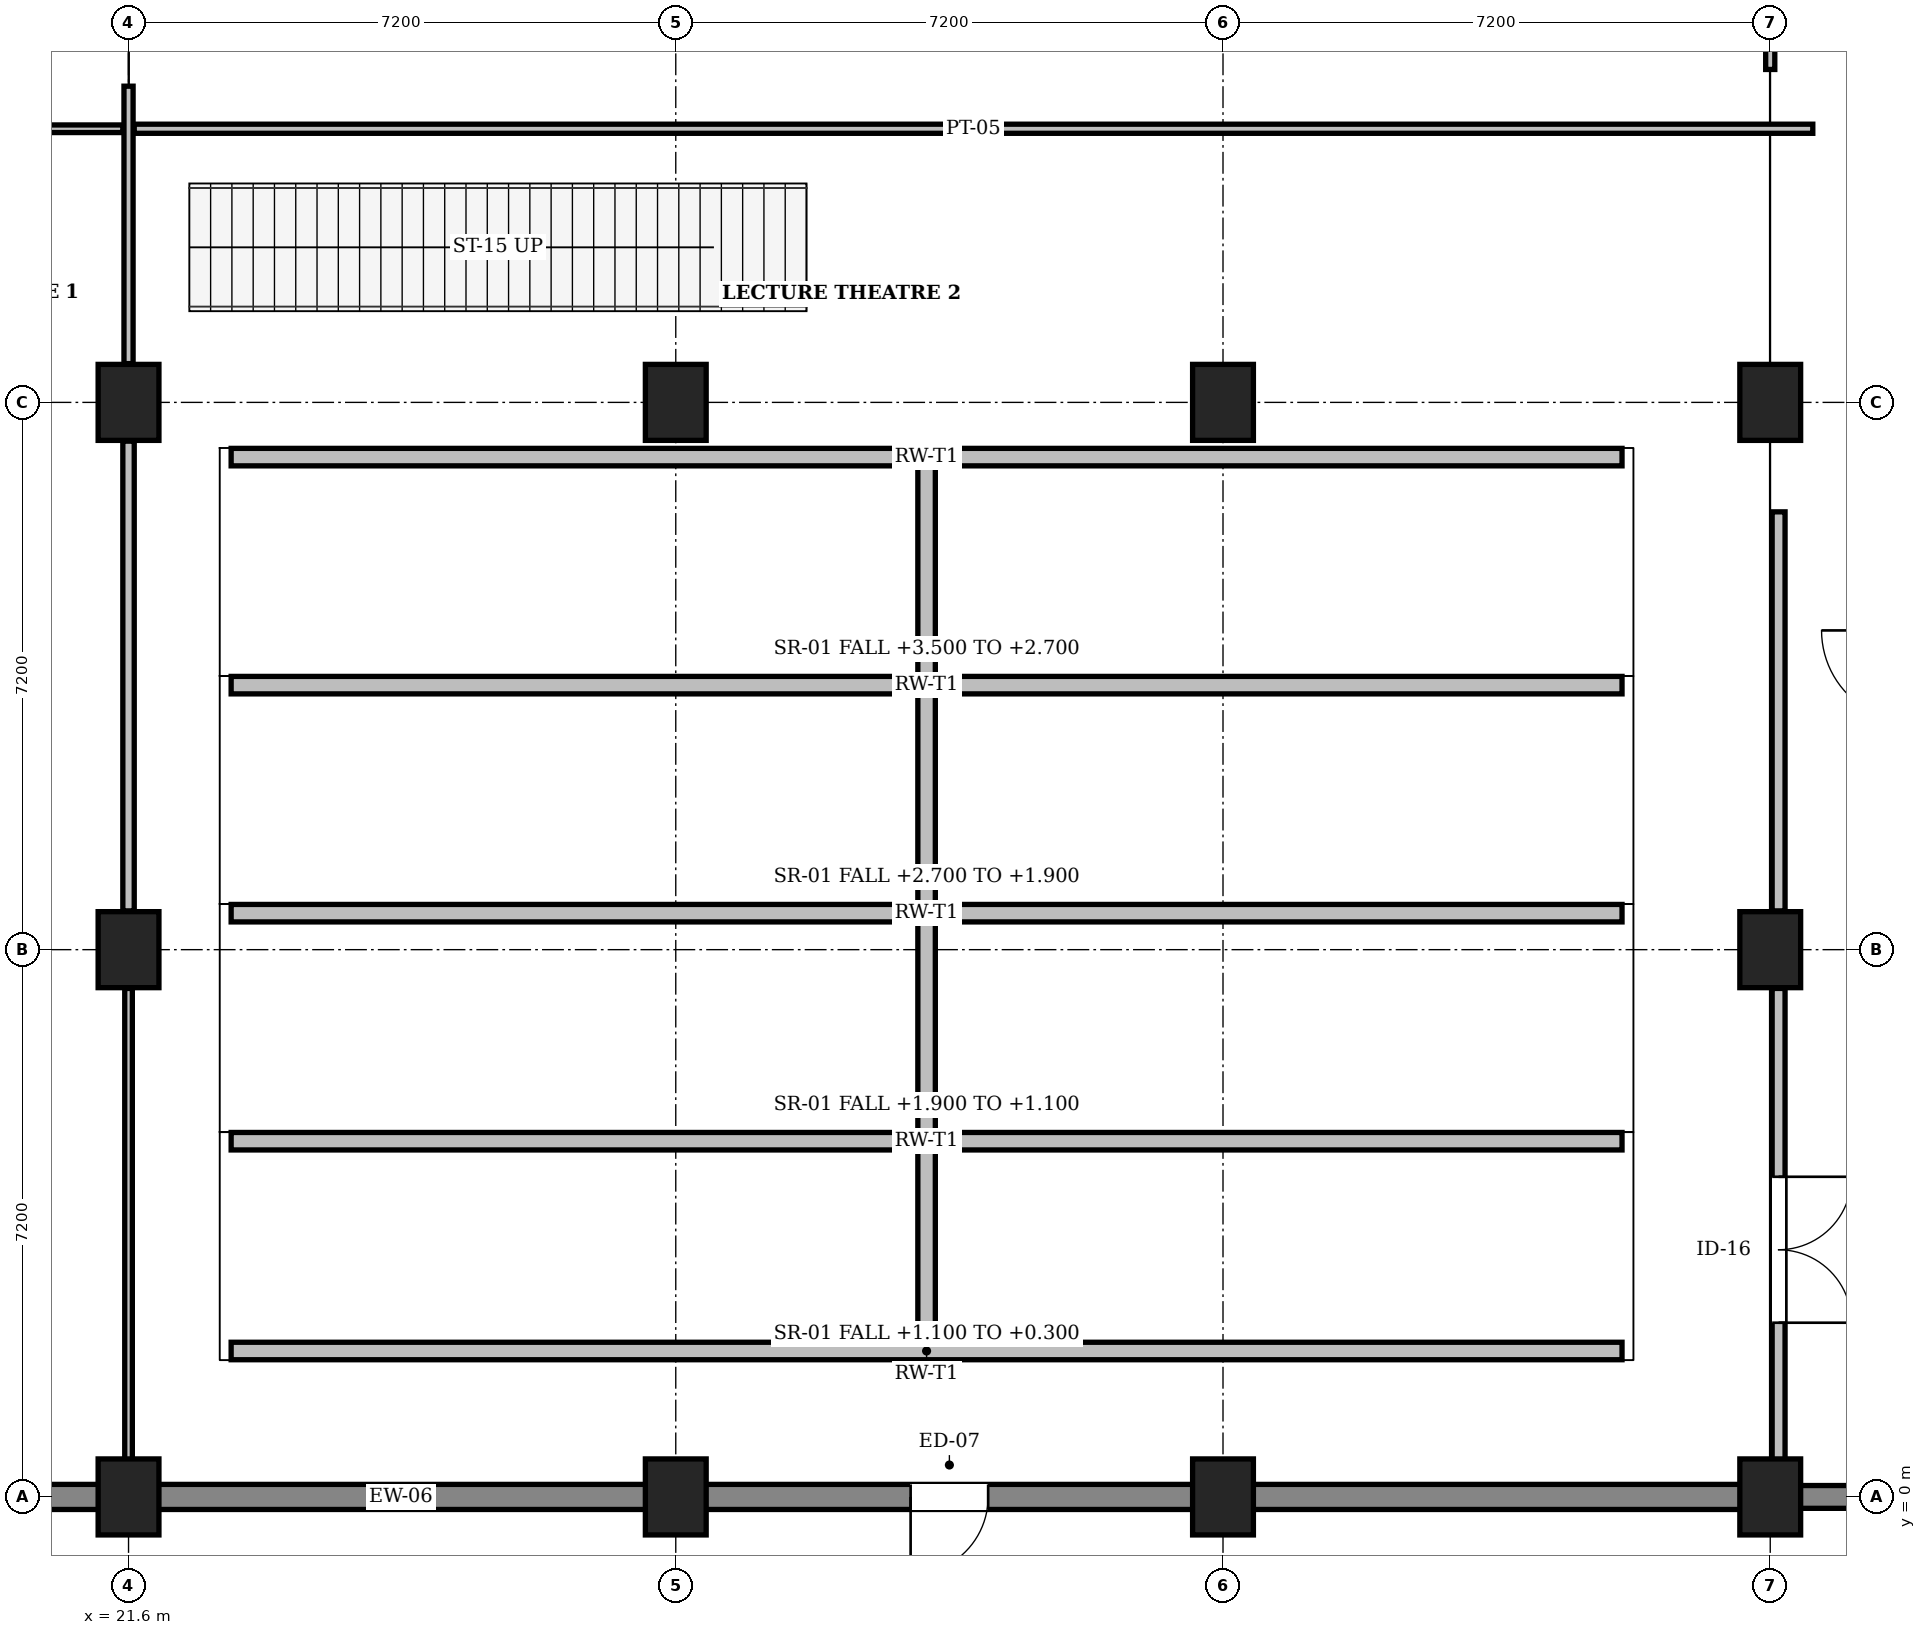
"""IFC4 building model, lengths in metres.
Left out: names, types, materials, properties, quantities, classifications, styles, units other than length and angle.
Written with IfcOpenShell. Run it as: python <this file> out.ifc"""

import sys

from ifc_helpers import new_model, si_unit, direction, frame, frame_2d, origin, origin_2d, place, context, subcontext, project, spatial, rectangle, extrude, element, fill, save


model = new_model("IFC4")
c1 = context("Model", 3, precision=1e-05, world=origin(), true_north=direction((0.0, 1.0)))
c2 = subcontext(c1, "Body", "Model", "MODEL_VIEW")
j1 = project(units=[si_unit("LENGTHUNIT", "METRE"), si_unit("PLANEANGLEUNIT", "RADIAN")], contexts=[c1])
p1 = place(None, origin())
s1 = spatial("IfcSite", under=j1, at=p1, CompositionType="ELEMENT")
p2 = place(p1, origin())
s2 = spatial("IfcBuilding", under=s1, at=p2, CompositionType="ELEMENT")
p3 = place(p2, origin())
s3 = spatial("IfcBuildingStorey", under=s2, at=p3, CompositionType="ELEMENT", Elevation=0.0)
for number, where, z_axis, x_axis in (
    (1, (21.6, 0.0, 0.0), (0.0, 0.0, 1.0), (1.0, 0.0, 0.0)),
    (2, (21.6, 7.2, 0.0), (0.0, 0.0, 1.0), (1.0, 0.0, 0.0)),
    (3, (21.6, 14.4, 0.0), (0.0, 0.0, 1.0), (1.0, 0.0, 0.0)),
    (4, (28.8, 0.0, 0.0), (0.0, 0.0, 1.0), (1.0, 0.0, 0.0)),
    (5, (28.8, 14.4, 0.0), (0.0, 0.0, 1.0), (1.0, 0.0, 0.0)),
    (6, (36.0, 0.0, 0.0), (0.0, 0.0, 1.0), (1.0, 0.0, 0.0)),
    (7, (36.0, 14.4, 0.0), (0.0, 0.0, 1.0), (1.0, 0.0, 0.0)),
    (8, (43.2, 0.0, 0.0), (0.0, 0.0, 1.0), (1.0, 0.0, 0.0)),
    (9, (43.2, 7.2, 0.0), (0.0, 0.0, 1.0), (1.0, 0.0, 0.0)),
    (10, (43.2, 14.4, 0.0), (0.0, 0.0, 1.0), (1.0, 0.0, 0.0)),
):
    element("IfcColumn", number, at=place(p3, frame(where, z_axis=z_axis, x_axis=x_axis)), inside=s3, PredefinedType="COLUMN", context=c2, shape_type="SweptSolid", body=[
        extrude(rectangle(XDim=0.8, YDim=1.0, at=origin_2d()), origin(), (0.0, 0.0, 1.0), 4.8),
    ])
p4 = place(p3, frame((22.95, 1.92, 0.0), z_axis=(0.0, 0.0, 1.0), x_axis=(1.0, 0.0, 0.0)))
e11 = element("IfcWall", 11, at=p4, inside=s3, PredefinedType="SOLIDWALL", context=c2, shape_type="SweptSolid", body=[
    extrude(rectangle(XDim=18.3, YDim=0.23, at=frame_2d((9.15, 0.0))), origin(), (0.0, 0.0, 1.0), 0.1),
])
p5 = place(p3, frame((22.95, 4.68, 0.0), z_axis=(0.0, 0.0, 1.0), x_axis=(1.0, 0.0, 0.0)))
e12 = element("IfcWall", 12, at=p5, inside=s3, PredefinedType="SOLIDWALL", context=c2, shape_type="SweptSolid", body=[
    extrude(rectangle(XDim=18.3, YDim=0.23, at=frame_2d((9.15, 0.0))), origin(), (0.0, 0.0, 1.0), 0.88),
])
p6 = place(p3, frame((32.1, 2.035, 0.0), z_axis=(0.0, 0.0, 1.0), x_axis=(0.0, 1.0, 0.0)))
e13 = element("IfcWall", 13, at=p6, inside=s3, PredefinedType="SOLIDWALL", context=c2, shape_type="SweptSolid", body=[
    extrude(rectangle(XDim=2.53, YDim=0.23, at=frame_2d((1.265, 0.0))), origin(), (0.0, 0.0, 1.0), 0.48),
])
p7 = place(p3, frame((22.95, 7.68, 0.0), z_axis=(0.0, 0.0, 1.0), x_axis=(1.0, 0.0, 0.0)))
e14 = element("IfcWall", 14, at=p7, inside=s3, PredefinedType="SOLIDWALL", context=c2, shape_type="SweptSolid", body=[
    extrude(rectangle(XDim=18.3, YDim=0.23, at=frame_2d((9.15, 0.0))), origin(), (0.0, 0.0, 1.0), 1.68),
])
p8 = place(p3, frame((32.1, 4.795, 0.0), z_axis=(0.0, 0.0, 1.0), x_axis=(0.0, 1.0, 0.0)))
e15 = element("IfcWall", 15, at=p8, inside=s3, PredefinedType="SOLIDWALL", context=c2, shape_type="SweptSolid", body=[
    extrude(rectangle(XDim=2.77, YDim=0.23, at=frame_2d((1.385, 0.0))), origin(), (0.0, 0.0, 1.0), 1.28),
])
p9 = place(p3, frame((22.95, 10.68, 0.0), z_axis=(0.0, 0.0, 1.0), x_axis=(1.0, 0.0, 0.0)))
e16 = element("IfcWall", 16, at=p9, inside=s3, PredefinedType="SOLIDWALL", context=c2, shape_type="SweptSolid", body=[
    extrude(rectangle(XDim=18.3, YDim=0.23, at=frame_2d((9.15, 0.0))), origin(), (0.0, 0.0, 1.0), 2.48),
])
p10 = place(p3, frame((32.1, 7.795, 0.0), z_axis=(0.0, 0.0, 1.0), x_axis=(0.0, 1.0, 0.0)))
e17 = element("IfcWall", 17, at=p10, inside=s3, PredefinedType="SOLIDWALL", context=c2, shape_type="SweptSolid", body=[
    extrude(rectangle(XDim=2.77, YDim=0.23, at=frame_2d((1.385, 0.0))), origin(), (0.0, 0.0, 1.0), 2.08),
])
p11 = place(p3, frame((22.95, 13.68, 0.0), z_axis=(0.0, 0.0, 1.0), x_axis=(1.0, 0.0, 0.0)))
e18 = element("IfcWall", 18, at=p11, inside=s3, PredefinedType="SOLIDWALL", context=c2, shape_type="SweptSolid", body=[
    extrude(rectangle(XDim=18.3, YDim=0.23, at=frame_2d((9.15, 0.0))), origin(), (0.0, 0.0, 1.0), 3.28),
])
p12 = place(p3, frame((32.1, 10.795, 0.0), z_axis=(0.0, 0.0, 1.0), x_axis=(0.0, 1.0, 0.0)))
e19 = element("IfcWall", 19, at=p12, inside=s3, PredefinedType="SOLIDWALL", context=c2, shape_type="SweptSolid", body=[
    extrude(rectangle(XDim=2.77, YDim=0.23, at=frame_2d((1.385, 0.0))), origin(), (0.0, 0.0, 1.0), 2.88),
])
p13 = place(p3, frame((50.4, 0.0, 0.0), z_axis=(0.0, 0.0, 1.0), x_axis=(-1.0, 0.0, 0.0)))
e20 = element("IfcWall", 20, at=p13, inside=s3, PredefinedType="SOLIDWALL", context=c2, shape_type="SweptSolid", body=[
    extrude(rectangle(XDim=7.2, YDim=0.3, at=frame_2d((3.6, 0.0))), origin(), (0.0, 0.0, 1.0), 4.52),
])
p14 = place(p13, frame((2.8, 0.0, 0.0)))
e21 = element("IfcOpeningElement", 21, at=p14, cuts=e20, PredefinedType="OPENING", context=c2, shape_type="SweptSolid", body=[
    extrude(rectangle(XDim=1.6, YDim=2.2, at=frame_2d((0.8, 1.1))), frame((0.0, 0.162, 0.0), z_axis=(0.0, -1.0, 0.0), x_axis=(1.0, 0.0, 0.0)), (0.0, 0.0, 1.0), 0.324),
])
p15 = place(p3, frame((43.2, 0.0, 0.0), z_axis=(0.0, 0.0, 1.0), x_axis=(-1.0, 0.0, 0.0)))
e22 = element("IfcWall", 22, at=p15, inside=s3, PredefinedType="SOLIDWALL", context=c2, shape_type="SweptSolid", body=[
    extrude(rectangle(XDim=7.2, YDim=0.33, at=frame_2d((3.6, 0.0))), origin(), (0.0, 0.0, 1.0), 4.52),
])
p16 = place(p3, frame((36.0, 0.0, 0.0), z_axis=(0.0, 0.0, 1.0), x_axis=(-1.0, 0.0, 0.0)))
e23 = element("IfcWall", 23, at=p16, inside=s3, PredefinedType="SOLIDWALL", context=c2, shape_type="SweptSolid", body=[
    extrude(rectangle(XDim=7.2, YDim=0.33, at=frame_2d((3.6, 0.0))), origin(), (0.0, 0.0, 1.0), 4.52),
])
p17 = place(p16, frame((3.09, 0.0, 0.0)))
e24 = element("IfcOpeningElement", 24, at=p17, cuts=e23, PredefinedType="OPENING", context=c2, shape_type="SweptSolid", body=[
    extrude(rectangle(XDim=1.02, YDim=2.12, at=frame_2d((0.51, 1.06))), frame((0.0, 0.177, 0.0), z_axis=(0.0, -1.0, 0.0), x_axis=(1.0, 0.0, 0.0)), (0.0, 0.0, 1.0), 0.354),
])
p18 = place(p3, frame((28.8, 0.0, 0.0), z_axis=(0.0, 0.0, 1.0), x_axis=(-1.0, 0.0, 0.0)))
e25 = element("IfcWall", 25, at=p18, inside=s3, PredefinedType="SOLIDWALL", context=c2, shape_type="SweptSolid", body=[
    extrude(rectangle(XDim=7.2, YDim=0.33, at=frame_2d((3.6, 0.0))), origin(), (0.0, 0.0, 1.0), 4.52),
])
p19 = place(p3, frame((21.6, 0.0, 0.0), z_axis=(0.0, 0.0, 1.0), x_axis=(-1.0, 0.0, 0.0)))
e26 = element("IfcWall", 26, at=p19, inside=s3, PredefinedType="SOLIDWALL", context=c2, shape_type="SweptSolid", body=[
    extrude(rectangle(XDim=7.2, YDim=0.33, at=frame_2d((3.6, 0.0))), origin(), (0.0, 0.0, 1.0), 4.52),
])
p20 = place(p19, frame((3.12, 0.0, 0.0)))
e27 = element("IfcOpeningElement", 27, at=p20, cuts=e26, PredefinedType="OPENING", context=c2, shape_type="SweptSolid", body=[
    extrude(rectangle(XDim=0.96, YDim=2.1, at=frame_2d((0.48, 1.05))), frame((0.0, 0.177, 0.0), z_axis=(0.0, -1.0, 0.0), x_axis=(1.0, 0.0, 0.0)), (0.0, 0.0, 1.0), 0.354),
])
p21 = place(p3, frame((43.31, 0.162, 0.0), z_axis=(0.0, 0.0, 1.0), x_axis=(0.0, 1.0, 0.0)))
e28 = element("IfcWall", 28, at=p21, inside=s3, PredefinedType="PARTITIONING", context=c2, shape_type="SweptSolid", body=[
    extrude(rectangle(XDim=6.528, YDim=0.17, at=frame_2d((3.264, 0.0))), origin(), (0.0, 0.0, 1.0), 4.08),
])
p22 = place(p21, frame((2.13, 0.0, 0.0)))
e29 = element("IfcOpeningElement", 29, at=p22, cuts=e28, PredefinedType="OPENING", context=c2, shape_type="SweptSolid", body=[
    extrude(rectangle(XDim=1.92, YDim=2.32, at=frame_2d((0.96, 1.16))), frame((0.0, 0.097, 0.0), z_axis=(0.0, -1.0, 0.0), x_axis=(1.0, 0.0, 0.0)), (0.0, 0.0, 1.0), 0.194),
])
p23 = place(p3, frame((43.31, 7.71, 0.0), z_axis=(0.0, 0.0, 1.0), x_axis=(0.0, 1.0, 0.0)))
e30 = element("IfcWall", 30, at=p23, inside=s3, PredefinedType="PARTITIONING", context=c2, shape_type="SweptSolid", body=[
    extrude(rectangle(XDim=5.25, YDim=0.17, at=frame_2d((2.625, 0.0))), origin(), (0.0, 0.0, 1.0), 4.08),
])
p24 = place(p3, frame((21.6, 0.177, 0.0), z_axis=(0.0, 0.0, 1.0), x_axis=(0.0, 1.0, 0.0)))
e31 = element("IfcWall", 31, at=p24, inside=s3, PredefinedType="PARTITIONING", context=c2, shape_type="SweptSolid", body=[
    extrude(rectangle(XDim=6.513, YDim=0.1, at=frame_2d((3.256, 0.0))), origin(), (0.0, 0.0, 1.0), 4.08),
])
p25 = place(p3, frame((21.6, 7.71, 0.0), z_axis=(0.0, 0.0, 1.0), x_axis=(0.0, 1.0, 0.0)))
e32 = element("IfcWall", 32, at=p25, inside=s3, PredefinedType="PARTITIONING", context=c2, shape_type="SweptSolid", body=[
    extrude(rectangle(XDim=6.18, YDim=0.15, at=frame_2d((3.09, 0.0))), origin(), (0.0, 0.0, 1.0), 4.08),
])
p26 = place(p3, frame((21.6, 14.91, 0.0), z_axis=(0.0, 0.0, 1.0), x_axis=(0.0, 1.0, 0.0)))
e33 = element("IfcWall", 33, at=p26, inside=s3, PredefinedType="PARTITIONING", context=c2, shape_type="SweptSolid", body=[
    extrude(rectangle(XDim=3.65, YDim=0.12, at=frame_2d((1.825, 0.0))), origin(), (0.0, 0.0, 1.0), 4.08),
])
p27 = place(p3, frame((12.5, 18.0, 0.0), z_axis=(0.0, 0.0, 1.0), x_axis=(1.0, 0.0, 0.0)))
e34 = element("IfcWall", 34, at=p27, inside=s3, PredefinedType="PARTITIONING", context=c2, shape_type="SweptSolid", body=[
    extrude(rectangle(XDim=9.025, YDim=0.1, at=frame_2d((4.512, 0.0))), origin(), (0.0, 0.0, 1.0), 4.46),
])
p28 = place(p27, frame((3.843, 0.0, 0.0)))
e35 = element("IfcOpeningElement", 35, at=p28, cuts=e34, PredefinedType="OPENING", context=c2, shape_type="SweptSolid", body=[
    extrude(rectangle(XDim=1.34, YDim=2.24, at=frame_2d((0.67, 1.12))), frame((0.0, 0.062, 0.0), z_axis=(0.0, -1.0, 0.0), x_axis=(1.0, 0.0, 0.0)), (0.0, 0.0, 1.0), 0.124),
])
p29 = place(p3, frame((21.675, 18.0, 0.0), z_axis=(0.0, 0.0, 1.0), x_axis=(1.0, 0.0, 0.0)))
e36 = element("IfcWall", 36, at=p29, inside=s3, PredefinedType="PARTITIONING", context=c2, shape_type="SweptSolid", body=[
    extrude(rectangle(XDim=22.085, YDim=0.12, at=frame_2d((11.042, 0.0))), origin(), (0.0, 0.0, 1.0), 4.46),
])
p30 = place(p3, frame((43.2, 18.78, 0.0), z_axis=(0.0, 0.0, 1.0), x_axis=(0.0, 1.0, 0.0)))
e37 = element("IfcWall", 37, at=p30, inside=s3, PredefinedType="PARTITIONING", context=c2, shape_type="SweptSolid", body=[
    extrude(rectangle(XDim=2.31, YDim=0.12, at=frame_2d((1.155, 0.0))), origin(), (0.0, 0.0, 1.0), 4.08),
])
p31 = place(p17, origin())
e38 = element("IfcDoor", 38, at=p31, inside=s3, OperationType="SINGLE_SWING_RIGHT", PredefinedType="DOOR", context=c2, shape_type="SweptSolid", body=[
    extrude(rectangle(XDim=1.02, YDim=2.12, at=frame_2d((0.51, 1.06))), frame((0.0, 0.025, 0.0), z_axis=(0.0, -1.0, 0.0), x_axis=(1.0, 0.0, 0.0)), (0.0, 0.0, 1.0), 0.05),
])
fill(e24, e38)
p32 = place(p22, frame((1.92, 0.0, 0.0), z_axis=(0.0, 0.0, 1.0), x_axis=(-1.0, 0.0, 0.0)))
e39 = element("IfcDoor", 39, at=p32, inside=s3, OperationType="DOUBLE_DOOR_SINGLE_SWING", PredefinedType="DOOR", context=c2, shape_type="SweptSolid", body=[
    extrude(rectangle(XDim=1.92, YDim=2.32, at=frame_2d((0.96, 1.16))), frame((0.0, 0.025, 0.0), z_axis=(0.0, -1.0, 0.0), x_axis=(1.0, 0.0, 0.0)), (0.0, 0.0, 1.0), 0.05),
])
fill(e29, e39)
save(model, sys.argv[1])
